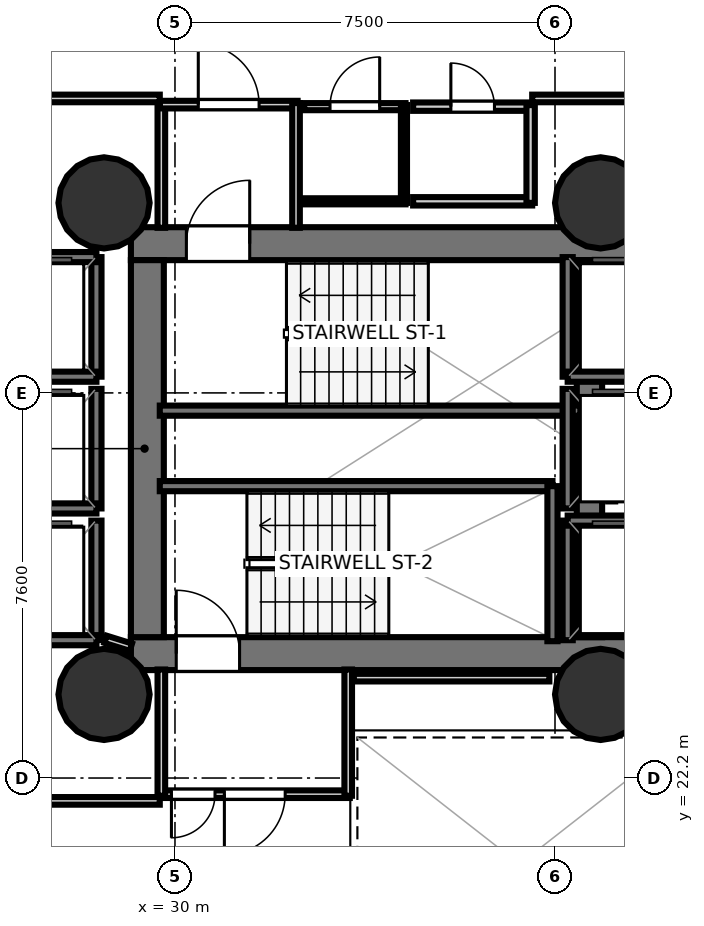
"""IFC4 building model, lengths in metres.
Left out: names, types, materials, properties, quantities, classifications, styles, units other than length and angle.
Written with IfcOpenShell. Run it as: python <this file> out.ifc"""

import sys

from ifc_helpers import new_model, si_unit, direction, frame, frame_2d, origin, origin_2d, place, context, subcontext, project, spatial, rectangle, hollow_circle, extrude, element, fill, save


model = new_model("IFC4")
c1 = context("Model", 3, precision=1e-05, world=origin(), true_north=direction((0.0, 1.0)))
c2 = subcontext(c1, "Body", "Model", "MODEL_VIEW")
j1 = project(units=[si_unit("LENGTHUNIT", "METRE"), si_unit("PLANEANGLEUNIT", "RADIAN")], contexts=[c1])
p1 = place(None, origin())
s1 = spatial("IfcSite", under=j1, at=p1, CompositionType="ELEMENT")
p2 = place(p1, origin())
s2 = spatial("IfcBuilding", under=s1, at=p2, CompositionType="ELEMENT")
p3 = place(p2, frame((0.0, 0.0, 40.5)))
s3 = spatial("IfcBuildingStorey", under=s2, at=p3, CompositionType="ELEMENT", Elevation=40.5)
p4 = place(p3, frame((29.13, 32.745, 0.0), z_axis=(0.0, 0.0, 1.0), x_axis=(1.0, 0.0, 0.0)))
e1 = element("IfcWall", 1, at=p4, inside=s3, PredefinedType="SHEAR", context=c2, shape_type="SweptSolid", body=[
    extrude(rectangle(XDim=10.72, YDim=0.65, at=frame_2d((5.36, 0.0))), origin(), (0.0, 0.0, 1.0), 3.52),
])
p5 = place(p4, frame((1.095, 0.0, 0.0)))
e2 = element("IfcOpeningElement", 2, at=p5, cuts=e1, PredefinedType="OPENING", context=c2, shape_type="SweptSolid", body=[
    extrude(rectangle(XDim=1.25, YDim=2.15, at=frame_2d((0.625, 1.075))), frame((0.0, 0.335, 0.0), z_axis=(0.0, -1.0, 0.0), x_axis=(1.0, 0.0, 0.0)), (0.0, 0.0, 1.0), 0.67),
])
p6 = place(p3, frame((29.13, 24.655, 0.0), z_axis=(0.0, 0.0, 1.0), x_axis=(1.0, 0.0, 0.0)))
e3 = element("IfcWall", 3, at=p6, inside=s3, PredefinedType="SHEAR", context=c2, shape_type="SweptSolid", body=[
    extrude(rectangle(XDim=10.72, YDim=0.65, at=frame_2d((5.36, 0.0))), origin(), (0.0, 0.0, 1.0), 3.52),
])
p7 = place(p6, frame((0.895, 0.0, 0.0)))
e4 = element("IfcOpeningElement", 4, at=p7, cuts=e3, PredefinedType="OPENING", context=c2, shape_type="SweptSolid", body=[
    extrude(rectangle(XDim=1.25, YDim=2.15, at=frame_2d((0.625, 1.075))), frame((0.0, 0.335, 0.0), z_axis=(0.0, -1.0, 0.0), x_axis=(1.0, 0.0, 0.0)), (0.0, 0.0, 1.0), 0.67),
])
p8 = place(p3, frame((29.455, 24.98, 0.0), z_axis=(0.0, 0.0, 1.0), x_axis=(0.0, 1.0, 0.0)))
e5 = element("IfcWall", 5, at=p8, inside=s3, PredefinedType="SHEAR", context=c2, shape_type="SweptSolid", body=[
    extrude(rectangle(XDim=7.44, YDim=0.65, at=frame_2d((3.72, 0.0))), origin(), (0.0, 0.0, 1.0), 3.52),
])
p9 = place(p3, frame((38.18, 24.98, 0.0), z_axis=(0.0, 0.0, 1.0), x_axis=(0.0, 1.0, 0.0)))
e6 = element("IfcWall", 6, at=p9, inside=s3, PredefinedType="SHEAR", context=c2, shape_type="SweptSolid", body=[
    extrude(rectangle(XDim=7.44, YDim=0.5, at=frame_2d((3.72, 0.0))), origin(), (0.0, 0.0, 1.0), 3.52),
])
for number, where, z_axis, x_axis in (
    (7, (28.6, 33.55, 0.0), (0.0, 0.0, 1.0), (1.0, 0.0, 0.0)),
    (8, (28.6, 23.85, 0.0), (0.0, 0.0, 1.0), (1.0, 0.0, 0.0)),
    (9, (38.4, 33.55, 0.0), (0.0, 0.0, 1.0), (1.0, 0.0, 0.0)),
    (10, (38.4, 23.85, 0.0), (0.0, 0.0, 1.0), (1.0, 0.0, 0.0)),
):
    element("IfcColumn", number, at=place(p3, frame(where, z_axis=z_axis, x_axis=x_axis)), inside=s3, PredefinedType="COLUMN", context=c2, shape_type="SweptSolid", body=[
        extrude(hollow_circle(Radius=0.9, WallThickness=0.045, at=origin_2d()), origin(), (0.0, 0.0, 1.0), 3.7),
    ])
p10 = place(p3, frame((29.7, 29.45, 0.0), z_axis=(0.0, 0.0, 1.0), x_axis=(1.0, 0.0, 0.0)))
e11 = element("IfcWall", 11, at=p10, inside=s3, PredefinedType="SOLIDWALL", context=c2, shape_type="SweptSolid", body=[
    extrude(rectangle(XDim=8.3, YDim=0.2, at=frame_2d((4.15, 0.0))), origin(), (0.0, 0.0, 1.0), 3.52),
])
p11 = place(p3, frame((29.7, 27.96, 0.0), z_axis=(0.0, 0.0, 1.0), x_axis=(1.0, 0.0, 0.0)))
e12 = element("IfcWall", 12, at=p11, inside=s3, PredefinedType="SOLIDWALL", context=c2, shape_type="SweptSolid", body=[
    extrude(rectangle(XDim=7.75, YDim=0.2, at=frame_2d((3.875, 0.0))), origin(), (0.0, 0.0, 1.0), 3.52),
])
p12 = place(p3, frame((37.45, 24.9, 0.0), z_axis=(0.0, 0.0, 1.0), x_axis=(0.0, 1.0, 0.0)))
e13 = element("IfcWall", 13, at=p12, inside=s3, PredefinedType="SOLIDWALL", context=c2, shape_type="SweptSolid", body=[
    extrude(rectangle(XDim=3.06, YDim=0.2, at=frame_2d((1.53, 0.0))), origin(), (0.0, 0.0, 1.0), 3.52),
])
p13 = place(p3, frame((37.75, 30.12, 0.0), z_axis=(0.0, 0.0, 1.0), x_axis=(0.0, 1.0, 0.0)))
e14 = element("IfcWall", 14, at=p13, inside=s3, PredefinedType="SOLIDWALL", context=c2, shape_type="SweptSolid", body=[
    extrude(rectangle(XDim=2.36, YDim=0.2, at=frame_2d((1.18, 0.0))), origin(), (0.0, 0.0, 1.0), 3.52),
])
p14 = place(p3, frame((37.75, 30.12, 0.0), z_axis=(0.0, 0.0, 1.0), x_axis=(1.0, 0.0, 0.0)))
e15 = element("IfcWall", 15, at=p14, inside=s3, PredefinedType="SOLIDWALL", context=c2, shape_type="SweptSolid", body=[
    extrude(rectangle(XDim=2.1, YDim=0.2, at=frame_2d((1.05, 0.0))), origin(), (0.0, 0.0, 1.0), 3.52),
])
p15 = place(p3, frame((37.75, 24.92, 0.0), z_axis=(0.0, 0.0, 1.0), x_axis=(0.0, 1.0, 0.0)))
e16 = element("IfcWall", 16, at=p15, inside=s3, PredefinedType="SOLIDWALL", context=c2, shape_type="SweptSolid", body=[
    extrude(rectangle(XDim=2.36, YDim=0.2, at=frame_2d((1.18, 0.0))), origin(), (0.0, 0.0, 1.0), 3.52),
])
p16 = place(p3, frame((37.75, 27.28, 0.0), z_axis=(0.0, 0.0, 1.0), x_axis=(1.0, 0.0, 0.0)))
e17 = element("IfcWall", 17, at=p16, inside=s3, PredefinedType="SOLIDWALL", context=c2, shape_type="SweptSolid", body=[
    extrude(rectangle(XDim=2.1, YDim=0.2, at=frame_2d((1.05, 0.0))), origin(), (0.0, 0.0, 1.0), 3.52),
])
p17 = place(p3, frame((28.45, 30.12, 0.0), z_axis=(0.0, 0.0, 1.0), x_axis=(0.0, 1.0, 0.0)))
e18 = element("IfcWall", 18, at=p17, inside=s3, PredefinedType="SOLIDWALL", context=c2, shape_type="SweptSolid", body=[
    extrude(rectangle(XDim=2.36, YDim=0.2, at=frame_2d((1.18, 0.0))), origin(), (0.0, 0.0, 1.0), 3.52),
])
for number, where, z_axis, x_axis in (
    (19, (26.35, 32.48, 0.0), (0.0, 0.0, 1.0), (1.0, 0.0, 0.0)),
    (20, (26.35, 30.12, 0.0), (0.0, 0.0, 1.0), (1.0, 0.0, 0.0)),
):
    element("IfcWall", number, at=place(p3, frame(where, z_axis=z_axis, x_axis=x_axis)), inside=s3, PredefinedType="SOLIDWALL", context=c2, shape_type="SweptSolid", body=[
        extrude(rectangle(XDim=2.1, YDim=0.2, at=frame_2d((1.05, 0.0))), origin(), (0.0, 0.0, 1.0), 3.52),
    ])
p18 = place(p3, frame((28.45, 27.52, 0.0), z_axis=(0.0, 0.0, 1.0), x_axis=(0.0, 1.0, 0.0)))
e21 = element("IfcWall", 21, at=p18, inside=s3, PredefinedType="SOLIDWALL", context=c2, shape_type="SweptSolid", body=[
    extrude(rectangle(XDim=2.36, YDim=0.2, at=frame_2d((1.18, 0.0))), origin(), (0.0, 0.0, 1.0), 3.52),
])
p19 = place(p3, frame((26.35, 27.52, 0.0), z_axis=(0.0, 0.0, 1.0), x_axis=(1.0, 0.0, 0.0)))
e22 = element("IfcWall", 22, at=p19, inside=s3, PredefinedType="SOLIDWALL", context=c2, shape_type="SweptSolid", body=[
    extrude(rectangle(XDim=2.1, YDim=0.2, at=frame_2d((1.05, 0.0))), origin(), (0.0, 0.0, 1.0), 3.52),
])
p20 = place(p3, frame((28.45, 24.92, 0.0), z_axis=(0.0, 0.0, 1.0), x_axis=(0.0, 1.0, 0.0)))
e23 = element("IfcWall", 23, at=p20, inside=s3, PredefinedType="SOLIDWALL", context=c2, shape_type="SweptSolid", body=[
    extrude(rectangle(XDim=2.36, YDim=0.2, at=frame_2d((1.18, 0.0))), origin(), (0.0, 0.0, 1.0), 3.52),
])
p21 = place(p3, frame((26.35, 24.92, 0.0), z_axis=(0.0, 0.0, 1.0), x_axis=(1.0, 0.0, 0.0)))
e24 = element("IfcWall", 24, at=p21, inside=s3, PredefinedType="SOLIDWALL", context=c2, shape_type="SweptSolid", body=[
    extrude(rectangle(XDim=2.1, YDim=0.2, at=frame_2d((1.05, 0.0))), origin(), (0.0, 0.0, 1.0), 3.52),
])
p22 = place(p3, frame((37.75, 27.52, 0.0), z_axis=(0.0, 0.0, 1.0), x_axis=(0.0, 1.0, 0.0)))
e25 = element("IfcWall", 25, at=p22, inside=s3, PredefinedType="SOLIDWALL", context=c2, shape_type="SweptSolid", body=[
    extrude(rectangle(XDim=2.36, YDim=0.2, at=frame_2d((1.18, 0.0))), origin(), (0.0, 0.0, 1.0), 3.52),
])
p23 = place(p3, frame((29.731, 33.058, 0.0), z_axis=(0.0, 0.0, 1.0), x_axis=(0.0, 1.0, 0.0)))
e26 = element("IfcWall", 26, at=p23, inside=s3, PredefinedType="PARTITIONING", context=c2, shape_type="SweptSolid", body=[
    extrude(rectangle(XDim=2.462, YDim=0.15, at=frame_2d((1.231, 0.0))), origin(), (0.0, 0.0, 1.0), 2.84),
])
p24 = place(p3, frame((29.7, 35.489, 0.0), z_axis=(0.0, 0.0, 1.0), x_axis=(1.0, 0.0, 0.0)))
e27 = element("IfcWall", 27, at=p24, inside=s3, PredefinedType="PARTITIONING", context=c2, shape_type="SweptSolid", body=[
    extrude(rectangle(XDim=2.72, YDim=0.15, at=frame_2d((1.36, 0.0))), origin(), (0.0, 0.0, 1.0), 2.84),
])
p25 = place(p24, frame((0.76, 0.0, 0.0)))
e28 = element("IfcOpeningElement", 28, at=p25, cuts=e27, PredefinedType="OPENING", context=c2, shape_type="SweptSolid", body=[
    extrude(rectangle(XDim=1.2, YDim=2.15, at=frame_2d((0.6, 1.075))), frame((0.0, 0.085, 0.0), z_axis=(0.0, -1.0, 0.0), x_axis=(1.0, 0.0, 0.0)), (0.0, 0.0, 1.0), 0.17),
])
p26 = place(p3, frame((32.389, 35.52, 0.0), z_axis=(0.0, 0.0, 1.0), x_axis=(0.0, -1.0, 0.0)))
e29 = element("IfcWall", 29, at=p26, inside=s3, PredefinedType="PARTITIONING", context=c2, shape_type="SweptSolid", body=[
    extrude(rectangle(XDim=2.462, YDim=0.15, at=frame_2d((1.231, 0.0))), origin(), (0.0, 0.0, 1.0), 2.84),
])
p27 = place(p3, frame((33.45, 21.881, 0.0), z_axis=(0.0, 0.0, 1.0), x_axis=(-1.0, 0.0, 0.0)))
e30 = element("IfcWall", 30, at=p27, inside=s3, PredefinedType="PARTITIONING", context=c2, shape_type="SweptSolid", body=[
    extrude(rectangle(XDim=3.75, YDim=0.15, at=frame_2d((1.875, 0.0))), origin(), (0.0, 0.0, 1.0), 2.84),
])
p28 = place(p27, frame((1.275, 0.0, 0.0)))
e31 = element("IfcOpeningElement", 31, at=p28, cuts=e30, PredefinedType="OPENING", context=c2, shape_type="SweptSolid", body=[
    extrude(rectangle(XDim=1.2, YDim=2.15, at=frame_2d((0.6, 1.075))), frame((0.0, 0.085, 0.0), z_axis=(0.0, -1.0, 0.0), x_axis=(1.0, 0.0, 0.0)), (0.0, 0.0, 1.0), 0.17),
])
p29 = place(p27, frame((2.66, 0.0, 0.0)))
e32 = element("IfcOpeningElement", 32, at=p29, cuts=e30, PredefinedType="OPENING", context=c2, shape_type="SweptSolid", body=[
    extrude(rectangle(XDim=0.86, YDim=2.05, at=frame_2d((0.43, 1.025))), frame((0.0, 0.085, 0.0), z_axis=(0.0, -1.0, 0.0), x_axis=(1.0, 0.0, 0.0)), (0.0, 0.0, 1.0), 0.17),
])
for number, where, z_axis, x_axis in (
    (33, (29.731, 21.85, 0.0), (0.0, 0.0, 1.0), (0.0, 1.0, 0.0)),
    (34, (33.419, 24.342, 0.0), (0.0, 0.0, 1.0), (0.0, -1.0, 0.0)),
):
    element("IfcWall", number, at=place(p3, frame(where, z_axis=z_axis, x_axis=x_axis)), inside=s3, PredefinedType="PARTITIONING", context=c2, shape_type="SweptSolid", body=[
        extrude(rectangle(XDim=2.492, YDim=0.15, at=frame_2d((1.246, 0.0))), origin(), (0.0, 0.0, 1.0), 2.84),
    ])
p30 = place(p3, frame((34.55, 33.581, 0.0), z_axis=(0.0, 0.0, 1.0), x_axis=(-1.0, 0.0, 0.0)))
e35 = element("IfcWall", 35, at=p30, inside=s3, PredefinedType="PARTITIONING", context=c2, shape_type="SweptSolid", body=[
    extrude(rectangle(XDim=2.0, YDim=0.12, at=frame_2d((1.0, 0.0))), origin(), (0.0, 0.0, 1.0), 2.84),
])
p31 = place(p3, frame((32.55, 35.449, 0.0), z_axis=(0.0, 0.0, 1.0), x_axis=(1.0, 0.0, 0.0)))
e36 = element("IfcWall", 36, at=p31, inside=s3, PredefinedType="PARTITIONING", context=c2, shape_type="SweptSolid", body=[
    extrude(rectangle(XDim=2.0, YDim=0.14, at=frame_2d((1.0, 0.0))), origin(), (0.0, 0.0, 1.0), 2.84),
])
p32 = place(p31, frame((0.51, 0.0, 0.0)))
e37 = element("IfcOpeningElement", 37, at=p32, cuts=e36, PredefinedType="OPENING", context=c2, shape_type="SweptSolid", body=[
    extrude(rectangle(XDim=0.98, YDim=2.1, at=frame_2d((0.49, 1.05))), frame((0.0, 0.08, 0.0), z_axis=(0.0, -1.0, 0.0), x_axis=(1.0, 0.0, 0.0)), (0.0, 0.0, 1.0), 0.16),
])
p33 = place(p3, frame((34.519, 35.48, 0.0), z_axis=(0.0, 0.0, 1.0), x_axis=(0.0, -1.0, 0.0)))
e38 = element("IfcWall", 38, at=p33, inside=s3, PredefinedType="PARTITIONING", context=c2, shape_type="SweptSolid", body=[
    extrude(rectangle(XDim=1.93, YDim=0.12, at=frame_2d((0.965, 0.0))), origin(), (0.0, 0.0, 1.0), 2.84),
])
p34 = place(p3, frame((37.05, 33.581, 0.0), z_axis=(0.0, 0.0, 1.0), x_axis=(-1.0, 0.0, 0.0)))
e39 = element("IfcWall", 39, at=p34, inside=s3, PredefinedType="PLUMBINGWALL", context=c2, shape_type="SweptSolid", body=[
    extrude(rectangle(XDim=2.35, YDim=0.165, at=frame_2d((1.175, 0.0))), origin(), (0.0, 0.0, 1.0), 2.84),
])
p35 = place(p3, frame((34.7, 35.449, 0.0), z_axis=(0.0, 0.0, 1.0), x_axis=(1.0, 0.0, 0.0)))
e40 = element("IfcWall", 40, at=p35, inside=s3, PredefinedType="PLUMBINGWALL", context=c2, shape_type="SweptSolid", body=[
    extrude(rectangle(XDim=2.35, YDim=0.165, at=frame_2d((1.175, 0.0))), origin(), (0.0, 0.0, 1.0), 2.84),
])
p36 = place(p35, frame((0.745, 0.0, 0.0)))
e41 = element("IfcOpeningElement", 41, at=p36, cuts=e40, PredefinedType="OPENING", context=c2, shape_type="SweptSolid", body=[
    extrude(rectangle(XDim=0.86, YDim=2.05, at=frame_2d((0.43, 1.025))), frame((0.0, 0.093, 0.0), z_axis=(0.0, -1.0, 0.0), x_axis=(1.0, 0.0, 0.0)), (0.0, 0.0, 1.0), 0.185),
])
p37 = place(p3, frame((37.019, 35.48, 0.0), z_axis=(0.0, 0.0, 1.0), x_axis=(0.0, -1.0, 0.0)))
e42 = element("IfcWall", 42, at=p37, inside=s3, PredefinedType="PLUMBINGWALL", context=c2, shape_type="SweptSolid", body=[
    extrude(rectangle(XDim=1.93, YDim=0.165, at=frame_2d((0.965, 0.0))), origin(), (0.0, 0.0, 1.0), 2.84),
])
p38 = place(p3, frame((29.13, 24.782, 0.0), z_axis=(0.0, 0.0, 1.0), x_axis=(-0.955000482512, 0.296604245422, 0.0)))
e43 = element("IfcWall", 43, at=p38, inside=s3, PredefinedType="PARTITIONING", context=c2, shape_type="SweptSolid", body=[
    extrude(rectangle(XDim=0.524, YDim=0.15, at=frame_2d((0.262, 0.0))), origin(), (0.0, 0.0, 1.0), 2.84),
])
p39 = place(p3, frame((37.389, 24.181, 0.0), z_axis=(0.0, 0.0, 1.0), x_axis=(-1.0, 0.0, 0.0)))
e44 = element("IfcWall", 44, at=p39, inside=s3, PredefinedType="PARTITIONING", context=c2, shape_type="SweptSolid", body=[
    extrude(rectangle(XDim=3.859, YDim=0.15, at=frame_2d((1.929, 0.0))), origin(), (0.0, 0.0, 1.0), 2.84),
])
p40 = place(p3, frame((39.818, 35.611, 0.0), z_axis=(0.0, 0.0, 1.0), x_axis=(-1.0, 0.0, 0.0)))
e45 = element("IfcWall", 45, at=p40, inside=s3, PredefinedType="PARTITIONING", context=c2, shape_type="SweptSolid", body=[
    extrude(rectangle(XDim=2.768, YDim=0.15, at=frame_2d((1.384, 0.0))), origin(), (0.0, 0.0, 1.0), 2.84),
])
p41 = place(p3, frame((29.7, 35.611, 0.0), z_axis=(0.0, 0.0, 1.0), x_axis=(-1.0, 0.0, 0.0)))
e46 = element("IfcWall", 46, at=p41, inside=s3, PredefinedType="PARTITIONING", context=c2, shape_type="SweptSolid", body=[
    extrude(rectangle(XDim=3.28, YDim=0.15, at=frame_2d((1.64, 0.0))), origin(), (0.0, 0.0, 1.0), 2.798),
])
p42 = place(p3, frame((26.42, 21.749, 0.0), z_axis=(0.0, 0.0, 1.0), x_axis=(1.0, 0.0, 0.0)))
e47 = element("IfcWall", 47, at=p42, inside=s3, PredefinedType="PARTITIONING", context=c2, shape_type="SweptSolid", body=[
    extrude(rectangle(XDim=3.28, YDim=0.15, at=frame_2d((1.64, 0.0))), origin(), (0.0, 0.0, 1.0), 2.84),
])
p43 = place(p3, frame((38.282, 44.518, 0.0), z_axis=(0.0, 0.0, 1.0), x_axis=(0.66245043497, -0.74910574768, 0.0)))
e48 = element("IfcWall", 48, at=p43, inside=s3, PredefinedType="PARTITIONING", context=c2, shape_type="SweptSolid", body=[
    extrude(rectangle(XDim=31.025, YDim=0.105, at=frame_2d((15.512, 0.0))), origin(), (0.0, 0.0, 1.0), 2.798),
])
p44 = place(p5, origin())
e49 = element("IfcDoor", 49, at=p44, inside=s3, OperationType="SINGLE_SWING_RIGHT", PredefinedType="DOOR", context=c2, shape_type="SweptSolid", body=[
    extrude(rectangle(XDim=1.25, YDim=2.15, at=frame_2d((0.625, 1.075))), frame((0.0, 0.025, 0.0), z_axis=(0.0, -1.0, 0.0), x_axis=(1.0, 0.0, 0.0)), (0.0, 0.0, 1.0), 0.05),
])
fill(e2, e49)
p45 = place(p7, origin())
e50 = element("IfcDoor", 50, at=p45, inside=s3, OperationType="SINGLE_SWING_LEFT", PredefinedType="DOOR", context=c2, shape_type="SweptSolid", body=[
    extrude(rectangle(XDim=1.25, YDim=2.15, at=frame_2d((0.625, 1.075))), frame((0.0, 0.025, 0.0), z_axis=(0.0, -1.0, 0.0), x_axis=(1.0, 0.0, 0.0)), (0.0, 0.0, 1.0), 0.05),
])
fill(e4, e50)
p46 = place(p25, origin())
e51 = element("IfcDoor", 51, at=p46, inside=s3, OperationType="SINGLE_SWING_LEFT", PredefinedType="DOOR", context=c2, shape_type="SweptSolid", body=[
    extrude(rectangle(XDim=1.2, YDim=2.15, at=frame_2d((0.6, 1.075))), frame((0.0, 0.025, 0.0), z_axis=(0.0, -1.0, 0.0), x_axis=(1.0, 0.0, 0.0)), (0.0, 0.0, 1.0), 0.05),
])
fill(e28, e51)
p47 = place(p28, origin())
e52 = element("IfcDoor", 52, at=p47, inside=s3, OperationType="SINGLE_SWING_RIGHT", PredefinedType="DOOR", context=c2, shape_type="SweptSolid", body=[
    extrude(rectangle(XDim=1.2, YDim=2.15, at=frame_2d((0.6, 1.075))), frame((0.0, 0.025, 0.0), z_axis=(0.0, -1.0, 0.0), x_axis=(1.0, 0.0, 0.0)), (0.0, 0.0, 1.0), 0.05),
])
fill(e31, e52)
p48 = place(p32, origin())
e53 = element("IfcDoor", 53, at=p48, inside=s3, OperationType="SINGLE_SWING_RIGHT", PredefinedType="DOOR", context=c2, shape_type="SweptSolid", body=[
    extrude(rectangle(XDim=0.98, YDim=2.1, at=frame_2d((0.49, 1.05))), frame((0.0, 0.025, 0.0), z_axis=(0.0, -1.0, 0.0), x_axis=(1.0, 0.0, 0.0)), (0.0, 0.0, 1.0), 0.05),
])
fill(e37, e53)
p49 = place(p36, origin())
e54 = element("IfcDoor", 54, at=p49, inside=s3, OperationType="SINGLE_SWING_LEFT", PredefinedType="DOOR", context=c2, shape_type="SweptSolid", body=[
    extrude(rectangle(XDim=0.86, YDim=2.05, at=frame_2d((0.43, 1.025))), frame((0.0, 0.025, 0.0), z_axis=(0.0, -1.0, 0.0), x_axis=(1.0, 0.0, 0.0)), (0.0, 0.0, 1.0), 0.05),
])
fill(e41, e54)
p50 = place(p29, origin())
e55 = element("IfcDoor", 55, at=p50, inside=s3, OperationType="SINGLE_SWING_RIGHT", PredefinedType="DOOR", context=c2, shape_type="SweptSolid", body=[
    extrude(rectangle(XDim=0.86, YDim=2.05, at=frame_2d((0.43, 1.025))), frame((0.0, 0.025, 0.0), z_axis=(0.0, -1.0, 0.0), x_axis=(1.0, 0.0, 0.0)), (0.0, 0.0, 1.0), 0.05),
])
fill(e32, e55)
save(model, sys.argv[1])
